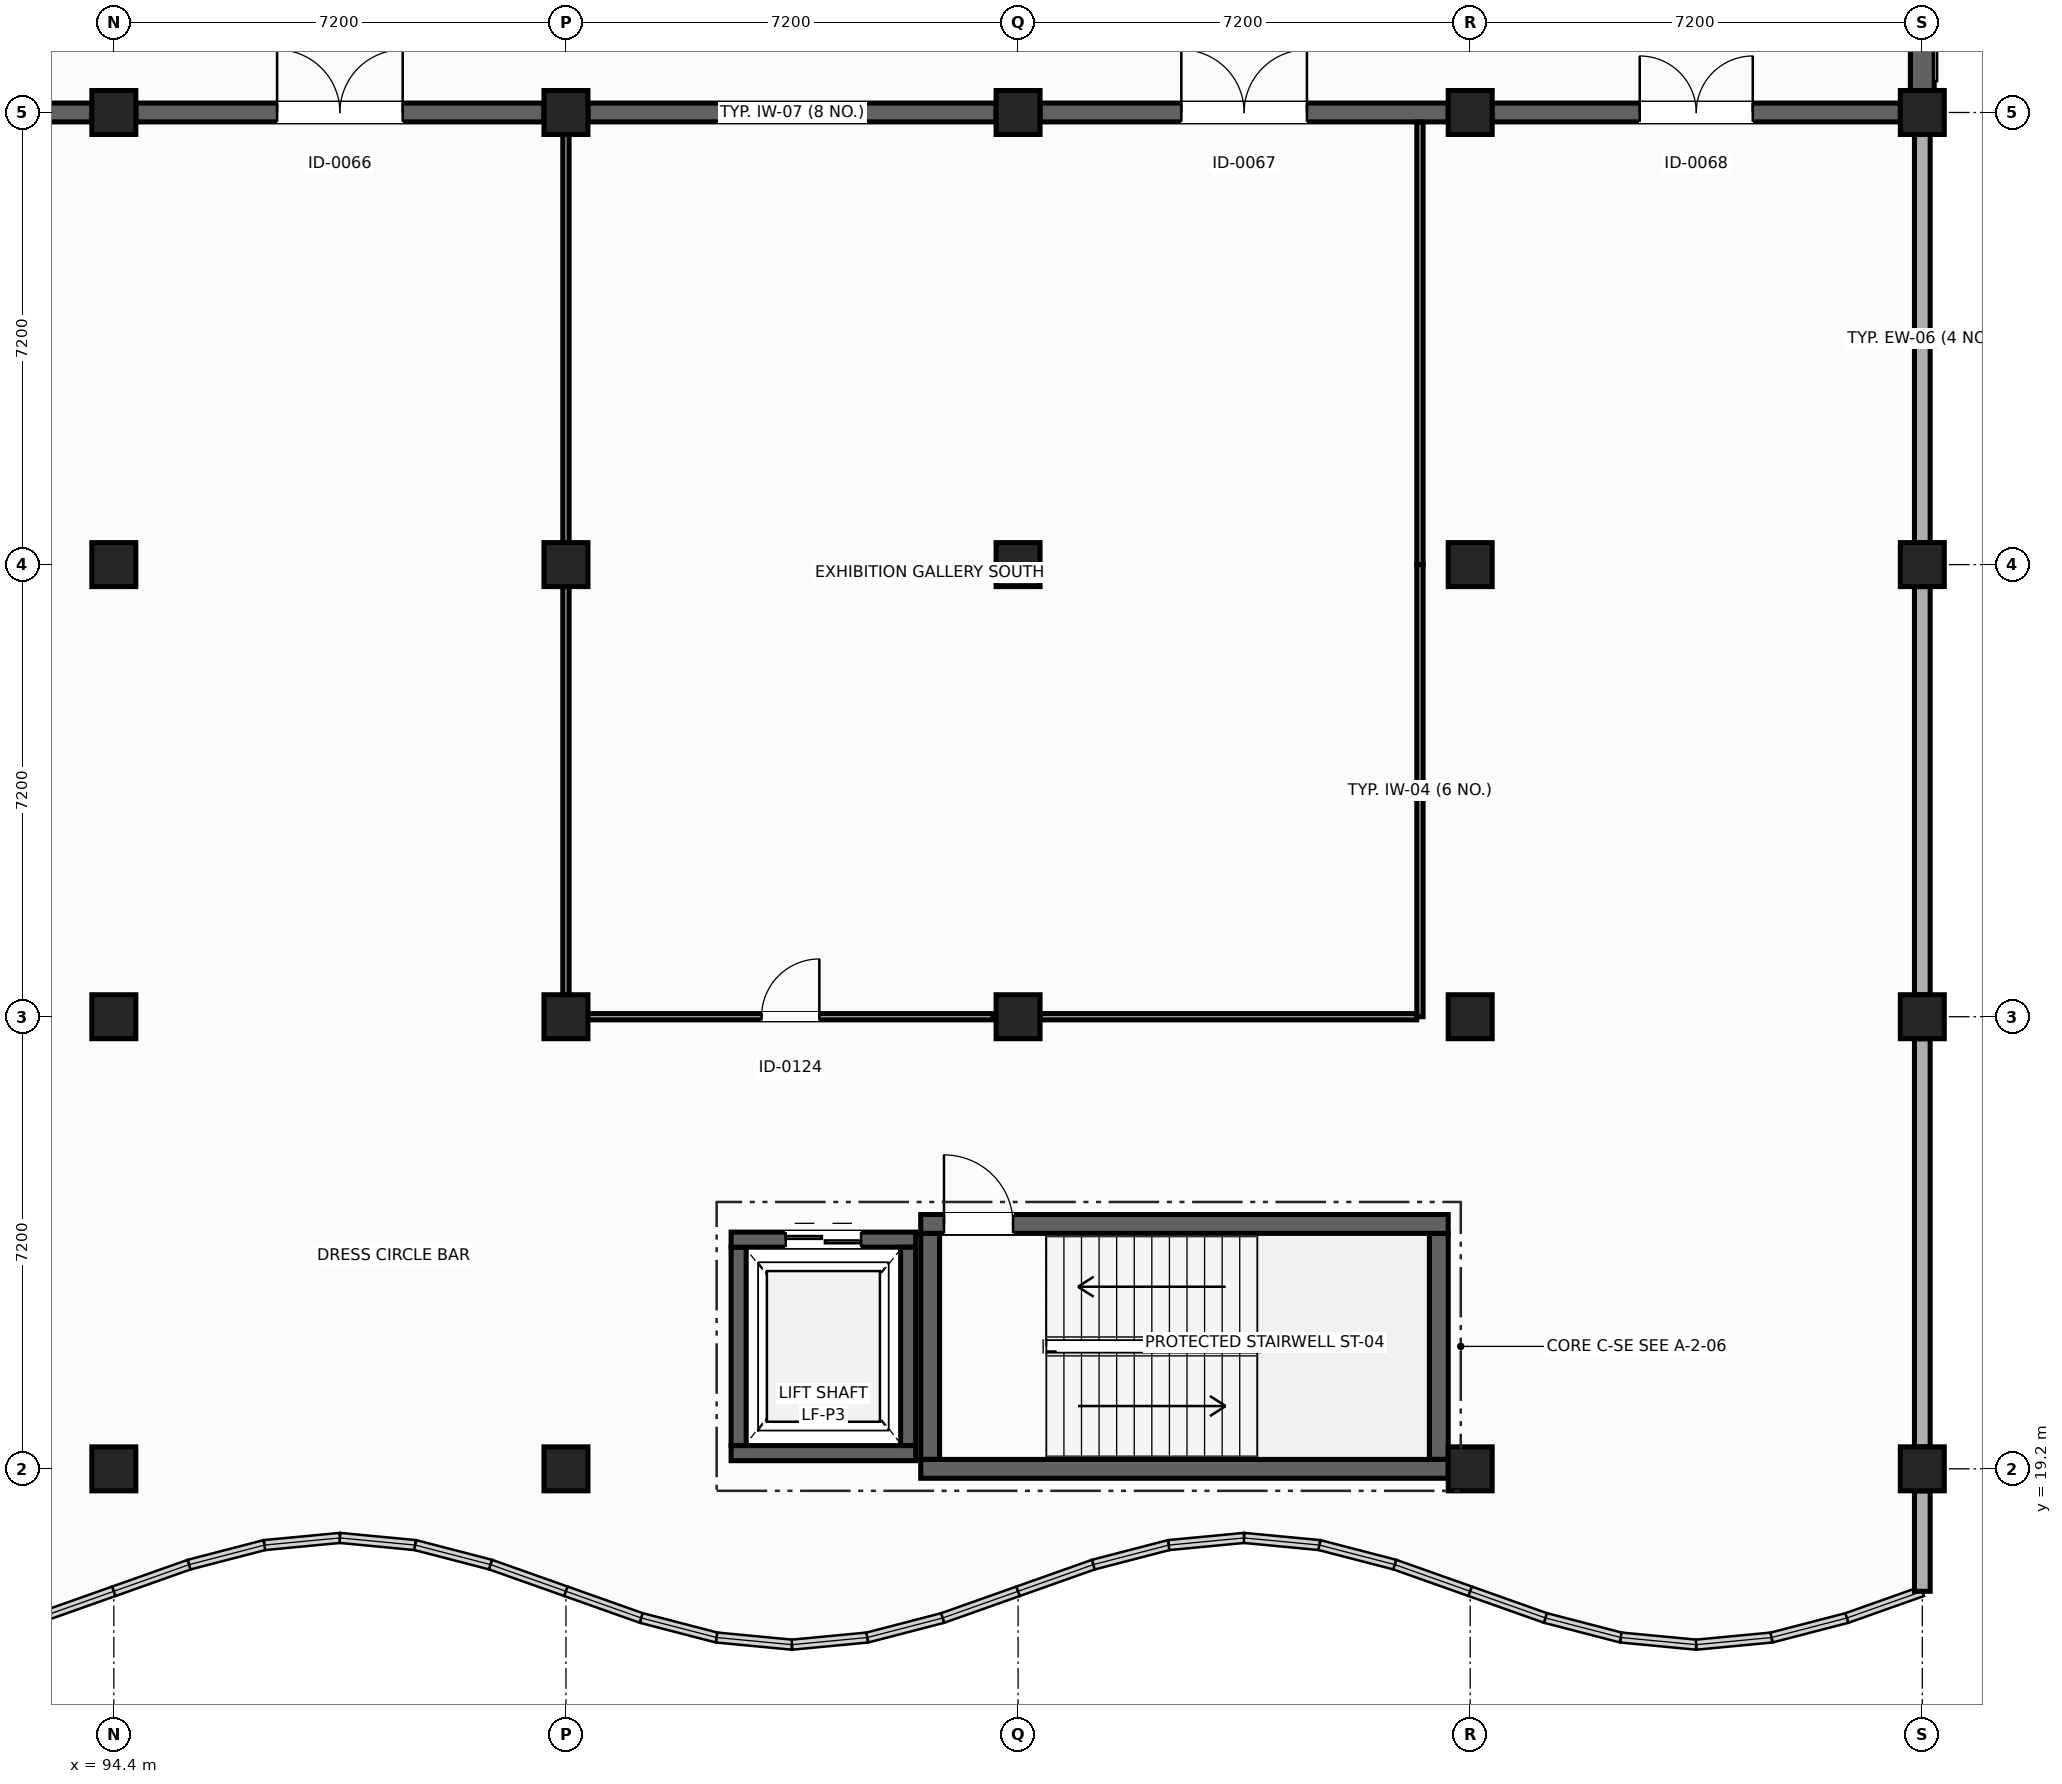
"""IFC4 building model, lengths in metres.
Left out: names, types, materials, properties, quantities, classifications, styles, units other than length and angle.
Written with IfcOpenShell. Run it as: python <this file> out.ifc"""

import sys

from ifc_helpers import new_model, si_unit, direction, frame, frame_2d, origin, origin_2d, place, context, subcontext, project, spatial, rectangle, extrude, element, fill, save


model = new_model("IFC4")
c1 = context("Model", 3, precision=1e-05, world=origin(), true_north=direction((0.0, 1.0)))
c2 = subcontext(c1, "Body", "Model", "MODEL_VIEW")
j1 = project(units=[si_unit("LENGTHUNIT", "METRE"), si_unit("PLANEANGLEUNIT", "RADIAN")], contexts=[c1])
p1 = place(None, origin())
s1 = spatial("IfcSite", under=j1, at=p1, CompositionType="ELEMENT")
p2 = place(p1, origin())
s2 = spatial("IfcBuilding", under=s1, at=p2, CompositionType="ELEMENT")
p3 = place(p2, frame((0.0, 0.0, 5.4)))
s3 = spatial("IfcBuildingStorey", under=s2, at=p3, CompositionType="ELEMENT", Elevation=5.4)
for number, where, z_axis, x_axis in (
    (1, (94.4, 19.2, 0.0), (0.0, 0.0, 1.0), (0.0, 1.0, 0.0)),
    (2, (101.6, 19.2, 0.0), (0.0, 0.0, 1.0), (1.0, 0.0, 0.0)),
    (3, (116.0, 19.2, 0.0), (0.0, 0.0, 1.0), (0.0, 1.0, 0.0)),
    (4, (123.2, 19.2, 0.0), (0.0, 0.0, 1.0), (1.0, 0.0, 0.0)),
    (5, (94.4, 26.4, 0.0), (0.0, 0.0, 1.0), (1.0, 0.0, 0.0)),
    (6, (101.6, 26.4, 0.0), (0.0, 0.0, 1.0), (1.0, 0.0, 0.0)),
    (7, (108.8, 26.4, 0.0), (0.0, 0.0, 1.0), (0.0, 1.0, 0.0)),
    (8, (116.0, 26.4, 0.0), (0.0, 0.0, 1.0), (1.0, 0.0, 0.0)),
    (9, (123.2, 26.4, 0.0), (0.0, 0.0, 1.0), (0.0, 1.0, 0.0)),
    (10, (94.4, 33.6, 0.0), (0.0, 0.0, 1.0), (1.0, 0.0, 0.0)),
    (11, (101.6, 33.6, 0.0), (0.0, 0.0, 1.0), (0.0, 1.0, 0.0)),
    (12, (108.8, 33.6, 0.0), (0.0, 0.0, 1.0), (1.0, 0.0, 0.0)),
    (13, (116.0, 33.6, 0.0), (0.0, 0.0, 1.0), (0.0, 1.0, 0.0)),
    (14, (123.2, 33.6, 0.0), (0.0, 0.0, 1.0), (1.0, 0.0, 0.0)),
    (15, (94.4, 40.8, 0.0), (0.0, 0.0, 1.0), (0.0, 1.0, 0.0)),
    (16, (101.6, 40.8, 0.0), (0.0, 0.0, 1.0), (1.0, 0.0, 0.0)),
    (17, (108.8, 40.8, 0.0), (0.0, 0.0, 1.0), (0.0, 1.0, 0.0)),
    (18, (116.0, 40.8, 0.0), (0.0, 0.0, 1.0), (1.0, 0.0, 0.0)),
    (19, (123.2, 40.8, 0.0), (0.0, 0.0, 1.0), (1.0, 0.0, 0.0)),
):
    element("IfcColumn", number, at=place(p3, frame(where, z_axis=z_axis, x_axis=x_axis)), inside=s3, PredefinedType="COLUMN", context=c2, shape_type="SweptSolid", body=[
        extrude(rectangle(XDim=0.7, YDim=0.7, at=origin_2d()), origin(), (0.0, 0.0, 1.0), 4.5),
    ])
for number, where, z_axis, x_axis in (
    (20, (123.2, 40.45, 0.0), (0.0, 0.0, 1.0), (0.0, -1.0, 0.0)),
    (21, (123.2, 33.25, 0.0), (0.0, 0.0, 1.0), (0.0, -1.0, 0.0)),
    (22, (123.2, 26.05, 0.0), (0.0, 0.0, 1.0), (0.0, -1.0, 0.0)),
):
    element("IfcWall", number, at=place(p3, frame(where, z_axis=z_axis, x_axis=x_axis)), inside=s3, PredefinedType="SOLIDWALL", context=c2, shape_type="SweptSolid", body=[
        extrude(rectangle(XDim=6.5, YDim=0.25, at=frame_2d((3.25, 0.0))), origin(), (0.0, 0.0, 1.0), 3.515),
    ])
p4 = place(p3, frame((123.2, 47.65, 0.0), z_axis=(0.0, 0.0, 1.0), x_axis=(0.0, -1.0, 0.0)))
e23 = element("IfcWall", 23, at=p4, inside=s3, PredefinedType="SHEAR", context=c2, shape_type="SweptSolid", body=[
    extrude(rectangle(XDim=6.5, YDim=0.38, at=frame_2d((3.25, 0.0))), origin(), (0.0, 0.0, 1.0), 4.2),
])
p5 = place(p3, frame((123.2, 17.25, 0.0), z_axis=(0.0, 0.0, 1.0), x_axis=(0.0, 1.0, 0.0)))
e24 = element("IfcWall", 24, at=p5, inside=s3, PredefinedType="SOLIDWALL", context=c2, shape_type="SweptSolid", body=[
    extrude(rectangle(XDim=1.6, YDim=0.25, at=frame_2d((0.8, 0.0))), origin(), (0.0, 0.0, 1.0), 3.375),
])
p6 = place(p3, frame((115.65, 19.2, 0.0), z_axis=(0.0, 0.0, 1.0), x_axis=(-1.0, 0.0, 0.0)))
e25 = element("IfcWall", 25, at=p6, inside=s3, PredefinedType="SHEAR", context=c2, shape_type="SweptSolid", body=[
    extrude(rectangle(XDim=8.4, YDim=0.3, at=frame_2d((4.2, 0.0))), origin(), (0.0, 0.0, 1.0), 4.22),
])
p7 = place(p3, frame((107.4, 19.352, 0.0), z_axis=(0.0, 0.0, 1.0), x_axis=(0.0, 1.0, 0.0)))
e26 = element("IfcWall", 26, at=p7, inside=s3, PredefinedType="SHEAR", context=c2, shape_type="SweptSolid", body=[
    extrude(rectangle(XDim=3.598, YDim=0.3, at=frame_2d((1.799, 0.0))), origin(), (0.0, 0.0, 1.0), 4.22),
])
p8 = place(p3, frame((107.25, 23.1, 0.0), z_axis=(0.0, 0.0, 1.0), x_axis=(1.0, 0.0, 0.0)))
e27 = element("IfcWall", 27, at=p8, inside=s3, PredefinedType="SHEAR", context=c2, shape_type="SweptSolid", body=[
    extrude(rectangle(XDim=8.4, YDim=0.3, at=frame_2d((4.2, 0.0))), origin(), (0.0, 0.0, 1.0), 4.22),
])
p9 = place(p8, frame((0.37, 0.0, 0.0)))
e28 = element("IfcOpeningElement", 28, at=p9, cuts=e27, PredefinedType="OPENING", context=c2, shape_type="SweptSolid", body=[
    extrude(rectangle(XDim=1.1, YDim=2.15, at=frame_2d((0.55, 1.075))), frame((0.0, 0.16, 0.0), z_axis=(0.0, -1.0, 0.0), x_axis=(1.0, 0.0, 0.0)), (0.0, 0.0, 1.0), 0.32),
])
p10 = place(p3, frame((115.5, 22.948, 0.0), z_axis=(0.0, 0.0, 1.0), x_axis=(0.0, -1.0, 0.0)))
e29 = element("IfcWall", 29, at=p10, inside=s3, PredefinedType="SHEAR", context=c2, shape_type="SweptSolid", body=[
    extrude(rectangle(XDim=3.596, YDim=0.3, at=frame_2d((1.798, 0.0))), origin(), (0.0, 0.0, 1.0), 4.22),
])
p11 = place(p3, frame((107.17, 19.45, 0.0), z_axis=(0.0, 0.0, 1.0), x_axis=(-1.0, 0.0, 0.0)))
e30 = element("IfcWall", 30, at=p11, inside=s3, PredefinedType="SHEAR", context=c2, shape_type="SweptSolid", body=[
    extrude(rectangle(XDim=2.94, YDim=0.24, at=frame_2d((1.47, 0.0))), origin(), (0.0, 0.0, 1.0), 4.22),
])
p12 = place(p3, frame((104.35, 19.572, 0.0), z_axis=(0.0, 0.0, 1.0), x_axis=(0.0, 1.0, 0.0)))
e31 = element("IfcWall", 31, at=p12, inside=s3, PredefinedType="SHEAR", context=c2, shape_type="SweptSolid", body=[
    extrude(rectangle(XDim=3.158, YDim=0.24, at=frame_2d((1.579, 0.0))), origin(), (0.0, 0.0, 1.0), 4.22),
])
p13 = place(p3, frame((104.23, 22.85, 0.0), z_axis=(0.0, 0.0, 1.0), x_axis=(1.0, 0.0, 0.0)))
e32 = element("IfcWall", 32, at=p13, inside=s3, PredefinedType="SHEAR", context=c2, shape_type="SweptSolid", body=[
    extrude(rectangle(XDim=2.94, YDim=0.24, at=frame_2d((1.47, 0.0))), origin(), (0.0, 0.0, 1.0), 4.22),
])
p14 = place(p13, frame((0.87, 0.0, 0.0)))
e33 = element("IfcOpeningElement", 33, at=p14, cuts=e32, PredefinedType="OPENING", context=c2, shape_type="SweptSolid", body=[
    extrude(rectangle(XDim=1.2, YDim=2.15, at=frame_2d((0.6, 1.075))), frame((0.0, 0.13, 0.0), z_axis=(0.0, -1.0, 0.0), x_axis=(1.0, 0.0, 0.0)), (0.0, 0.0, 1.0), 0.26),
])
p15 = place(p3, frame((107.05, 22.728, 0.0), z_axis=(0.0, 0.0, 1.0), x_axis=(0.0, -1.0, 0.0)))
e34 = element("IfcWall", 34, at=p15, inside=s3, PredefinedType="SHEAR", context=c2, shape_type="SweptSolid", body=[
    extrude(rectangle(XDim=3.156, YDim=0.24, at=frame_2d((1.578, 0.0))), origin(), (0.0, 0.0, 1.0), 4.22),
])
p16 = place(p3, frame((87.55, 40.8, 0.0), z_axis=(0.0, 0.0, 1.0), x_axis=(1.0, 0.0, 0.0)))
e35 = element("IfcWall", 35, at=p16, inside=s3, PredefinedType="SHEAR", context=c2, shape_type="SweptSolid", body=[
    extrude(rectangle(XDim=6.5, YDim=0.3, at=frame_2d((3.25, 0.0))), origin(), (0.0, 0.0, 1.0), 4.2),
])
p17 = place(p16, frame((2.35, 0.0, 0.0)))
e36 = element("IfcOpeningElement", 36, at=p17, cuts=e35, PredefinedType="OPENING", context=c2, shape_type="SweptSolid", body=[
    extrude(rectangle(XDim=1.8, YDim=2.3, at=frame_2d((0.9, 1.15))), frame((0.0, 0.16, 0.0), z_axis=(0.0, -1.0, 0.0), x_axis=(1.0, 0.0, 0.0)), (0.0, 0.0, 1.0), 0.32),
])
p18 = place(p3, frame((94.75, 40.8, 0.0), z_axis=(0.0, 0.0, 1.0), x_axis=(1.0, 0.0, 0.0)))
e37 = element("IfcWall", 37, at=p18, inside=s3, PredefinedType="SHEAR", context=c2, shape_type="SweptSolid", body=[
    extrude(rectangle(XDim=6.5, YDim=0.3, at=frame_2d((3.25, 0.0))), origin(), (0.0, 0.0, 1.0), 4.2),
])
p19 = place(p18, frame((2.25, 0.0, 0.0)))
e38 = element("IfcOpeningElement", 38, at=p19, cuts=e37, PredefinedType="OPENING", context=c2, shape_type="SweptSolid", body=[
    extrude(rectangle(XDim=2.0, YDim=2.35, at=frame_2d((1.0, 1.175))), frame((0.0, 0.16, 0.0), z_axis=(0.0, -1.0, 0.0), x_axis=(1.0, 0.0, 0.0)), (0.0, 0.0, 1.0), 0.32),
])
p20 = place(p3, frame((101.95, 40.8, 0.0), z_axis=(0.0, 0.0, 1.0), x_axis=(1.0, 0.0, 0.0)))
e39 = element("IfcWall", 39, at=p20, inside=s3, PredefinedType="SHEAR", context=c2, shape_type="SweptSolid", body=[
    extrude(rectangle(XDim=6.5, YDim=0.3, at=frame_2d((3.25, 0.0))), origin(), (0.0, 0.0, 1.0), 4.2),
])
p21 = place(p3, frame((109.15, 40.8, 0.0), z_axis=(0.0, 0.0, 1.0), x_axis=(1.0, 0.0, 0.0)))
e40 = element("IfcWall", 40, at=p21, inside=s3, PredefinedType="SHEAR", context=c2, shape_type="SweptSolid", body=[
    extrude(rectangle(XDim=6.5, YDim=0.3, at=frame_2d((3.25, 0.0))), origin(), (0.0, 0.0, 1.0), 4.2),
])
p22 = place(p21, frame((2.25, 0.0, 0.0)))
e41 = element("IfcOpeningElement", 41, at=p22, cuts=e40, PredefinedType="OPENING", context=c2, shape_type="SweptSolid", body=[
    extrude(rectangle(XDim=2.0, YDim=2.35, at=frame_2d((1.0, 1.175))), frame((0.0, 0.16, 0.0), z_axis=(0.0, -1.0, 0.0), x_axis=(1.0, 0.0, 0.0)), (0.0, 0.0, 1.0), 0.32),
])
p23 = place(p3, frame((116.35, 40.8, 0.0), z_axis=(0.0, 0.0, 1.0), x_axis=(1.0, 0.0, 0.0)))
e42 = element("IfcWall", 42, at=p23, inside=s3, PredefinedType="SHEAR", context=c2, shape_type="SweptSolid", body=[
    extrude(rectangle(XDim=6.5, YDim=0.3, at=frame_2d((3.25, 0.0))), origin(), (0.0, 0.0, 1.0), 4.2),
])
p24 = place(p23, frame((2.35, 0.0, 0.0)))
e43 = element("IfcOpeningElement", 43, at=p24, cuts=e42, PredefinedType="OPENING", context=c2, shape_type="SweptSolid", body=[
    extrude(rectangle(XDim=1.8, YDim=2.3, at=frame_2d((0.9, 1.15))), frame((0.0, 0.16, 0.0), z_axis=(0.0, -1.0, 0.0), x_axis=(1.0, 0.0, 0.0)), (0.0, 0.0, 1.0), 0.32),
])
p25 = place(p3, frame((115.2, 26.4, 0.0), z_axis=(0.0, 0.0, 1.0), x_axis=(0.0, 1.0, 0.0)))
e44 = element("IfcWall", 44, at=p25, inside=s3, PredefinedType="PARTITIONING", context=c2, shape_type="SweptSolid", body=[
    extrude(rectangle(XDim=7.2, YDim=0.1, at=frame_2d((3.6, 0.0))), origin(), (0.0, 0.0, 1.0), 3.415),
])
p26 = place(p3, frame((115.2, 33.6, 0.0), z_axis=(0.0, 0.0, 1.0), x_axis=(0.0, 1.0, 0.0)))
e45 = element("IfcWall", 45, at=p26, inside=s3, PredefinedType="PARTITIONING", context=c2, shape_type="SweptSolid", body=[
    extrude(rectangle(XDim=7.048, YDim=0.1, at=frame_2d((3.524, 0.0))), origin(), (0.0, 0.0, 1.0), 3.415),
])
for number, where, z_axis, x_axis in (
    (46, (101.6, 40.45, 0.0), (0.0, 0.0, 1.0), (0.0, -1.0, 0.0)),
    (47, (101.6, 33.25, 0.0), (0.0, 0.0, 1.0), (0.0, -1.0, 0.0)),
):
    element("IfcWall", number, at=place(p3, frame(where, z_axis=z_axis, x_axis=x_axis)), inside=s3, PredefinedType="PARTITIONING", context=c2, shape_type="SweptSolid", body=[
        extrude(rectangle(XDim=6.5, YDim=0.1, at=frame_2d((3.25, 0.0))), origin(), (0.0, 0.0, 1.0), 3.515),
    ])
p27 = place(p3, frame((101.95, 26.4, 0.0), z_axis=(0.0, 0.0, 1.0), x_axis=(1.0, 0.0, 0.0)))
e48 = element("IfcWall", 48, at=p27, inside=s3, PredefinedType="PARTITIONING", context=c2, shape_type="SweptSolid", body=[
    extrude(rectangle(XDim=6.45, YDim=0.1, at=frame_2d((3.225, 0.0))), origin(), (0.0, 0.0, 1.0), 3.415),
])
p28 = place(p27, frame((2.765, 0.0, 0.0)))
e49 = element("IfcOpeningElement", 49, at=p28, cuts=e48, PredefinedType="OPENING", context=c2, shape_type="SweptSolid", body=[
    extrude(rectangle(XDim=0.92, YDim=2.1, at=frame_2d((0.46, 1.05))), frame((0.0, 0.06, 0.0), z_axis=(0.0, -1.0, 0.0), x_axis=(1.0, 0.0, 0.0)), (0.0, 0.0, 1.0), 0.12),
])
p29 = place(p3, frame((109.15, 26.4, 0.0), z_axis=(0.0, 0.0, 1.0), x_axis=(1.0, 0.0, 0.0)))
e50 = element("IfcWall", 50, at=p29, inside=s3, PredefinedType="PARTITIONING", context=c2, shape_type="SweptSolid", body=[
    extrude(rectangle(XDim=5.998, YDim=0.1, at=frame_2d((2.999, 0.0))), origin(), (0.0, 0.0, 1.0), 3.415),
])
p30 = place(p9, origin())
e51 = element("IfcDoor", 51, at=p30, inside=s3, OperationType="SINGLE_SWING_LEFT", PredefinedType="DOOR", context=c2, shape_type="SweptSolid", body=[
    extrude(rectangle(XDim=1.1, YDim=2.15, at=frame_2d((0.55, 1.075))), frame((0.0, 0.025, 0.0), z_axis=(0.0, -1.0, 0.0), x_axis=(1.0, 0.0, 0.0)), (0.0, 0.0, 1.0), 0.05),
])
fill(e28, e51)
p31 = place(p14, origin())
e52 = element("IfcDoor", 52, at=p31, inside=s3, OperationType="DOUBLE_DOOR_SLIDING", PredefinedType="DOOR", context=c2, shape_type="SweptSolid", body=[
    extrude(rectangle(XDim=1.2, YDim=2.15, at=frame_2d((0.6, 1.075))), frame((0.0, 0.025, 0.0), z_axis=(0.0, -1.0, 0.0), x_axis=(1.0, 0.0, 0.0)), (0.0, 0.0, 1.0), 0.05),
])
fill(e33, e52)
p32 = place(p19, origin())
e53 = element("IfcDoor", 53, at=p32, inside=s3, OperationType="DOUBLE_DOOR_SINGLE_SWING", PredefinedType="DOOR", context=c2, shape_type="SweptSolid", body=[
    extrude(rectangle(XDim=2.0, YDim=2.35, at=frame_2d((1.0, 1.175))), frame((0.0, 0.025, 0.0), z_axis=(0.0, -1.0, 0.0), x_axis=(1.0, 0.0, 0.0)), (0.0, 0.0, 1.0), 0.05),
])
fill(e38, e53)
p33 = place(p22, origin())
e54 = element("IfcDoor", 54, at=p33, inside=s3, OperationType="DOUBLE_DOOR_SINGLE_SWING", PredefinedType="DOOR", context=c2, shape_type="SweptSolid", body=[
    extrude(rectangle(XDim=2.0, YDim=2.35, at=frame_2d((1.0, 1.175))), frame((0.0, 0.025, 0.0), z_axis=(0.0, -1.0, 0.0), x_axis=(1.0, 0.0, 0.0)), (0.0, 0.0, 1.0), 0.05),
])
fill(e41, e54)
p34 = place(p24, origin())
e55 = element("IfcDoor", 55, at=p34, inside=s3, OperationType="DOUBLE_DOOR_SINGLE_SWING", PredefinedType="DOOR", context=c2, shape_type="SweptSolid", body=[
    extrude(rectangle(XDim=1.8, YDim=2.3, at=frame_2d((0.9, 1.15))), frame((0.0, 0.025, 0.0), z_axis=(0.0, -1.0, 0.0), x_axis=(1.0, 0.0, 0.0)), (0.0, 0.0, 1.0), 0.05),
])
fill(e43, e55)
p35 = place(p28, origin())
e56 = element("IfcDoor", 56, at=p35, inside=s3, OperationType="SINGLE_SWING_RIGHT", PredefinedType="DOOR", context=c2, shape_type="SweptSolid", body=[
    extrude(rectangle(XDim=0.92, YDim=2.1, at=frame_2d((0.46, 1.05))), frame((0.0, 0.025, 0.0), z_axis=(0.0, -1.0, 0.0), x_axis=(1.0, 0.0, 0.0)), (0.0, 0.0, 1.0), 0.05),
])
fill(e49, e56)
save(model, sys.argv[1])
